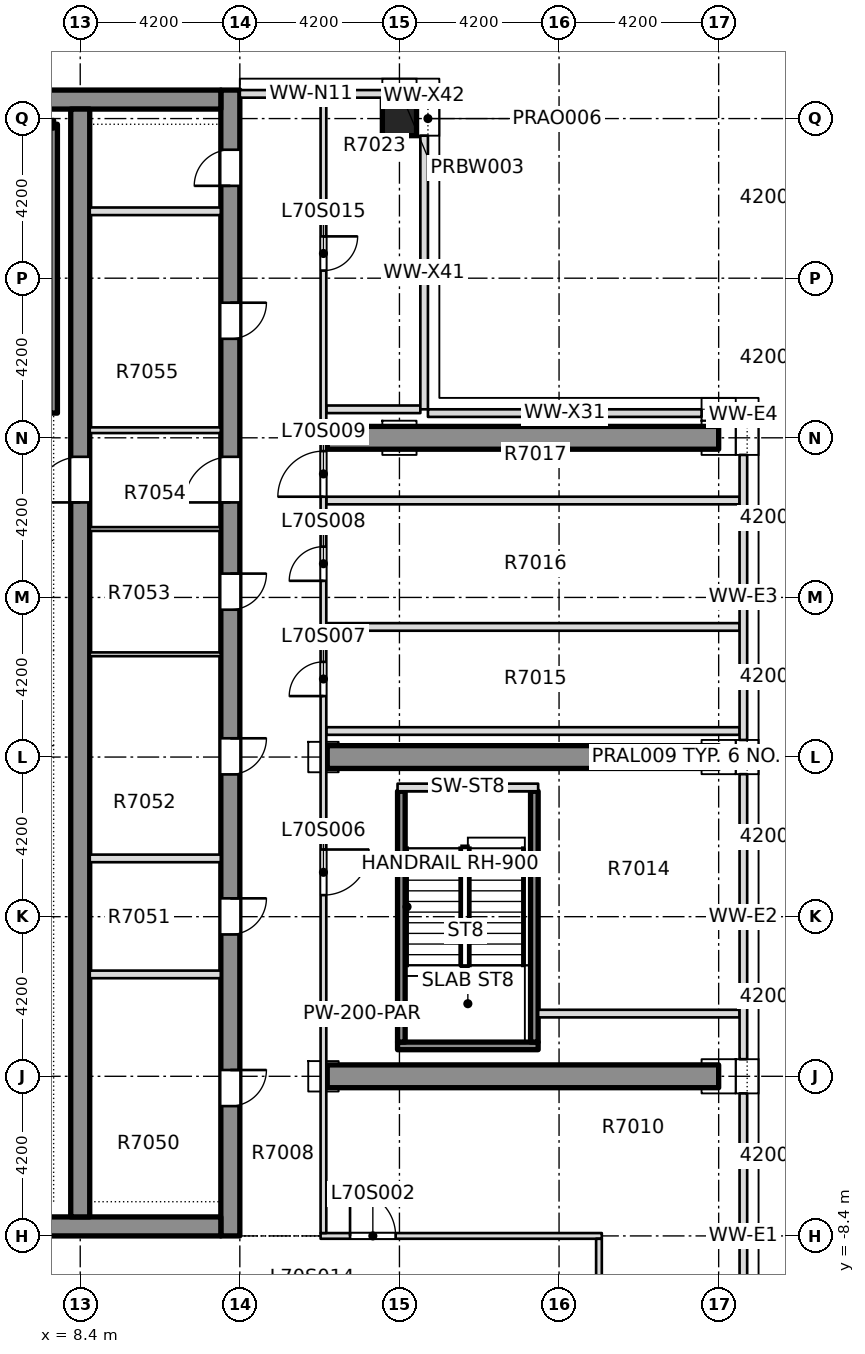
"""IFC4 building model, lengths in metres.
Left out: names, types, materials, properties, quantities, classifications, styles, units other than length and angle.
Written with IfcOpenShell. Run it as: python <this file> out.ifc"""

import sys

from ifc_helpers import new_model, si_unit, direction, frame, frame_2d, origin, origin_2d, place, context, subcontext, project, spatial, rectangle, extrude, element, fill, save


model = new_model("IFC4")
c1 = context("Model", 3, precision=1e-05, world=origin(), true_north=direction((0.0, 1.0)))
c2 = subcontext(c1, "Body", "Model", "MODEL_VIEW")
j1 = project(units=[si_unit("LENGTHUNIT", "METRE"), si_unit("PLANEANGLEUNIT", "RADIAN")], contexts=[c1])
p1 = place(None, origin())
s1 = spatial("IfcSite", under=j1, at=p1, CompositionType="ELEMENT")
p2 = place(p1, origin())
s2 = spatial("IfcBuilding", under=s1, at=p2, CompositionType="ELEMENT")
p3 = place(p2, frame((0.0, 0.0, 264.85)))
s3 = spatial("IfcBuildingStorey", under=s2, at=p3, CompositionType="ELEMENT", Elevation=264.85)
p4 = place(p3, frame((12.35, -8.4, -0.5), z_axis=(0.0, 0.0, 1.0), x_axis=(0.0, 1.0, 0.0)))
e1 = element("IfcWall", 1, at=p4, inside=s3, PredefinedType="SHEAR", context=c2, shape_type="SweptSolid", body=[
    extrude(rectangle(XDim=30.15, YDim=0.5, at=frame_2d((15.075, 0.0))), origin(), (0.0, 0.0, 1.0), 4.5),
])
p5 = place(p4, frame((3.416, 0.0, 0.5)))
e2 = element("IfcOpeningElement", 2, at=p5, cuts=e1, PredefinedType="OPENING", context=c2, shape_type="SweptSolid", body=[
    extrude(rectangle(XDim=0.95, YDim=2.1, at=frame_2d((0.475, 1.05))), frame((0.0, 0.26, 0.0), z_axis=(0.0, -1.0, 0.0), x_axis=(1.0, 0.0, 0.0)), (0.0, 0.0, 1.0), 0.52),
])
p6 = place(p4, frame((7.932, 0.0, 0.5)))
e3 = element("IfcOpeningElement", 3, at=p6, cuts=e1, PredefinedType="OPENING", context=c2, shape_type="SweptSolid", body=[
    extrude(rectangle(XDim=0.95, YDim=2.1, at=frame_2d((0.475, 1.05))), frame((0.0, 0.26, 0.0), z_axis=(0.0, -1.0, 0.0), x_axis=(1.0, 0.0, 0.0)), (0.0, 0.0, 1.0), 0.52),
])
p7 = place(p4, frame((12.144, 0.0, 0.5)))
e4 = element("IfcOpeningElement", 4, at=p7, cuts=e1, PredefinedType="OPENING", context=c2, shape_type="SweptSolid", body=[
    extrude(rectangle(XDim=0.95, YDim=2.1, at=frame_2d((0.475, 1.05))), frame((0.0, 0.26, 0.0), z_axis=(0.0, -1.0, 0.0), x_axis=(1.0, 0.0, 0.0)), (0.0, 0.0, 1.0), 0.52),
])
p8 = place(p4, frame((16.477, 0.0, 0.5)))
e5 = element("IfcOpeningElement", 5, at=p8, cuts=e1, PredefinedType="OPENING", context=c2, shape_type="SweptSolid", body=[
    extrude(rectangle(XDim=0.95, YDim=2.1, at=frame_2d((0.475, 1.05))), frame((0.0, 0.26, 0.0), z_axis=(0.0, -1.0, 0.0), x_axis=(1.0, 0.0, 0.0)), (0.0, 0.0, 1.0), 0.52),
])
p9 = place(p4, frame((23.605, 0.0, 0.5)))
e6 = element("IfcOpeningElement", 6, at=p9, cuts=e1, PredefinedType="OPENING", context=c2, shape_type="SweptSolid", body=[
    extrude(rectangle(XDim=0.95, YDim=2.1, at=frame_2d((0.475, 1.05))), frame((0.0, 0.26, 0.0), z_axis=(0.0, -1.0, 0.0), x_axis=(1.0, 0.0, 0.0)), (0.0, 0.0, 1.0), 0.52),
])
p10 = place(p4, frame((27.63, 0.0, 0.5)))
e7 = element("IfcOpeningElement", 7, at=p10, cuts=e1, PredefinedType="OPENING", context=c2, shape_type="SweptSolid", body=[
    extrude(rectangle(XDim=0.95, YDim=2.1, at=frame_2d((0.475, 1.05))), frame((0.0, 0.26, 0.0), z_axis=(0.0, -1.0, 0.0), x_axis=(1.0, 0.0, 0.0)), (0.0, 0.0, 1.0), 0.52),
])
p11 = place(p4, frame((19.3, 0.0, 0.5)))
e8 = element("IfcOpeningElement", 8, at=p11, cuts=e1, PredefinedType="OPENING", context=c2, shape_type="SweptSolid", body=[
    extrude(rectangle(XDim=1.2, YDim=2.1, at=frame_2d((0.6, 1.05))), frame((0.0, 0.26, 0.0), z_axis=(0.0, -1.0, 0.0), x_axis=(1.0, 0.0, 0.0)), (0.0, 0.0, 1.0), 0.52),
])
p12 = place(p3, frame((-12.1, -8.15, -0.5), z_axis=(0.0, 0.0, 1.0), x_axis=(1.0, 0.0, 0.0)))
e9 = element("IfcWall", 9, at=p12, inside=s3, PredefinedType="SHEAR", context=c2, shape_type="SweptSolid", body=[
    extrude(rectangle(XDim=24.2, YDim=0.5, at=frame_2d((12.1, 0.0))), origin(), (0.0, 0.0, 1.0), 4.5),
])
p13 = place(p12, frame((6.6, 0.0, 0.5)))
e10 = element("IfcOpeningElement", 10, at=p13, cuts=e9, PredefinedType="OPENING", context=c2, shape_type="SweptSolid", body=[
    extrude(rectangle(XDim=1.8, YDim=2.1, at=frame_2d((0.9, 1.05))), frame((0.0, 0.26, 0.0), z_axis=(0.0, -1.0, 0.0), x_axis=(1.0, 0.0, 0.0)), (0.0, 0.0, 1.0), 0.52),
])
p14 = place(p12, frame((15.8, 0.0, 0.5)))
e11 = element("IfcOpeningElement", 11, at=p14, cuts=e9, PredefinedType="OPENING", context=c2, shape_type="SweptSolid", body=[
    extrude(rectangle(XDim=1.8, YDim=2.1, at=frame_2d((0.9, 1.05))), frame((0.0, 0.26, 0.0), z_axis=(0.0, -1.0, 0.0), x_axis=(1.0, 0.0, 0.0)), (0.0, 0.0, 1.0), 0.52),
])
p15 = place(p3, frame((-12.1, 21.5, -0.5), z_axis=(0.0, 0.0, 1.0), x_axis=(1.0, 0.0, 0.0)))
e12 = element("IfcWall", 12, at=p15, inside=s3, PredefinedType="SHEAR", context=c2, shape_type="SweptSolid", body=[
    extrude(rectangle(XDim=24.2, YDim=0.5, at=frame_2d((12.1, 0.0))), origin(), (0.0, 0.0, 1.0), 4.5),
])
p16 = place(p3, frame((8.4, -7.9, -0.5), z_axis=(0.0, 0.0, 1.0), x_axis=(0.0, 1.0, 0.0)))
e13 = element("IfcWall", 13, at=p16, inside=s3, PredefinedType="SHEAR", context=c2, shape_type="SweptSolid", body=[
    extrude(rectangle(XDim=29.15, YDim=0.5, at=frame_2d((14.575, 0.0))), origin(), (0.0, 0.0, 1.0), 4.5),
])
p17 = place(p16, frame((18.8, 0.0, 0.5)))
e14 = element("IfcOpeningElement", 14, at=p17, cuts=e13, PredefinedType="OPENING", context=c2, shape_type="SweptSolid", body=[
    extrude(rectangle(XDim=1.2, YDim=2.1, at=frame_2d((0.6, 1.05))), frame((0.0, 0.26, 0.0), z_axis=(0.0, -1.0, 0.0), x_axis=(1.0, 0.0, 0.0)), (0.0, 0.0, 1.0), 0.52),
])
p18 = place(p3, frame((16.8, 21.0, -0.5), z_axis=(0.0, 0.0, 1.0), x_axis=(1.0, 0.0, 0.0)))
e15 = element("IfcColumn", 15, at=p18, inside=s3, PredefinedType="COLUMN", context=c2, shape_type="SweptSolid", body=[
    extrude(rectangle(XDim=0.9, YDim=0.9, at=origin_2d()), origin(), (0.0, 0.0, 1.0), 4.5),
])
for number, where, z_axis, x_axis in (
    (16, (14.9, -4.2, 0.0), (0.0, 0.0, 1.0), (1.0, 0.0, 0.0)),
    (17, (14.9, 4.2, 0.0), (0.0, 0.0, 1.0), (1.0, 0.0, 0.0)),
    (18, (14.9, 12.6, 0.0), (0.0, 0.0, 1.0), (1.0, 0.0, 0.0)),
):
    element("IfcWall", number, at=place(p3, frame(where, z_axis=z_axis, x_axis=x_axis)), inside=s3, PredefinedType="SHEAR", context=c2, shape_type="SweptSolid", body=[
        extrude(rectangle(XDim=10.3, YDim=0.6, at=frame_2d((5.15, 0.0))), origin(), (0.0, 0.0, 1.0), 4.0),
    ])
p19 = place(p3, frame((14.725, -8.4, 0.0), z_axis=(0.0, 0.0, 1.0), x_axis=(1.0, 0.0, 0.0)))
e19 = element("IfcWall", 19, at=p19, inside=s3, PredefinedType="PARTITIONING", context=c2, shape_type="SweptSolid", body=[
    extrude(rectangle(XDim=7.4, YDim=0.15, at=frame_2d((3.7, 0.0))), origin(), (0.0, 0.0, 1.0), 4.0),
])
p20 = place(p19, frame((0.775, 0.0, 0.0)))
e20 = element("IfcOpeningElement", 20, at=p20, cuts=e19, PredefinedType="OPENING", context=c2, shape_type="SweptSolid", body=[
    extrude(rectangle(XDim=1.2, YDim=2.1, at=frame_2d((0.6, 1.05))), frame((0.0, 0.085, 0.0), z_axis=(0.0, -1.0, 0.0), x_axis=(1.0, 0.0, 0.0)), (0.0, 0.0, 1.0), 0.17),
])
p21 = place(p3, frame((14.875, -2.55, 0.0), z_axis=(0.0, 0.0, 1.0), x_axis=(1.0, 0.0, 0.0)))
e21 = element("IfcWall", 21, at=p21, inside=s3, PredefinedType="PARTITIONING", context=c2, shape_type="SweptSolid", body=[
    extrude(rectangle(XDim=1.875, YDim=0.2, at=frame_2d((0.938, 0.0))), origin(), (0.0, 0.0, 1.0), 4.0),
])
p22 = place(p3, frame((20.45, -2.55, 0.0), z_axis=(0.0, 0.0, 1.0), x_axis=(1.0, 0.0, 0.0)))
e22 = element("IfcWall", 22, at=p22, inside=s3, PredefinedType="PARTITIONING", context=c2, shape_type="SweptSolid", body=[
    extrude(rectangle(XDim=5.3, YDim=0.2, at=frame_2d((2.65, 0.0))), origin(), (0.0, 0.0, 1.0), 4.0),
])
for number, where, z_axis, x_axis in (
    (23, (14.875, 4.885, 0.0), (0.0, 0.0, 1.0), (1.0, 0.0, 0.0)),
    (24, (14.875, 7.624, 0.0), (0.0, 0.0, 1.0), (1.0, 0.0, 0.0)),
    (25, (14.875, 10.95, 0.0), (0.0, 0.0, 1.0), (1.0, 0.0, 0.0)),
):
    element("IfcWall", number, at=place(p3, frame(where, z_axis=z_axis, x_axis=x_axis)), inside=s3, PredefinedType="PARTITIONING", context=c2, shape_type="SweptSolid", body=[
        extrude(rectangle(XDim=10.875, YDim=0.2, at=frame_2d((5.438, 0.0))), origin(), (0.0, 0.0, 1.0), 4.0),
    ])
p23 = place(p3, frame((14.875, 13.35, 0.0), z_axis=(0.0, 0.0, 1.0), x_axis=(1.0, 0.0, 0.0)))
e26 = element("IfcWall", 26, at=p23, inside=s3, PredefinedType="PARTITIONING", context=c2, shape_type="SweptSolid", body=[
    extrude(rectangle(XDim=2.475, YDim=0.2, at=frame_2d((1.238, 0.0))), origin(), (0.0, 0.0, 1.0), 4.0),
])
p24 = place(p3, frame((14.8, -8.325, 0.0), z_axis=(0.0, 0.0, 1.0), x_axis=(0.0, 1.0, 0.0)))
e27 = element("IfcWall", 27, at=p24, inside=s3, PredefinedType="PARTITIONING", context=c2, shape_type="SweptSolid", body=[
    extrude(rectangle(XDim=29.875, YDim=0.15, at=frame_2d((14.938, 0.0))), origin(), (0.0, 0.0, 1.0), 4.0),
])
p25 = place(p24, frame((8.892, 0.0, 0.0)))
e28 = element("IfcOpeningElement", 28, at=p25, cuts=e27, PredefinedType="OPENING", context=c2, shape_type="SweptSolid", body=[
    extrude(rectangle(XDim=1.2, YDim=2.1, at=frame_2d((0.6, 1.05))), frame((0.0, 0.085, 0.0), z_axis=(0.0, -1.0, 0.0), x_axis=(1.0, 0.0, 0.0)), (0.0, 0.0, 1.0), 0.17),
])
p26 = place(p24, frame((14.129, 0.0, 0.0)))
e29 = element("IfcOpeningElement", 29, at=p26, cuts=e27, PredefinedType="OPENING", context=c2, shape_type="SweptSolid", body=[
    extrude(rectangle(XDim=0.9, YDim=2.1, at=frame_2d((0.45, 1.05))), frame((0.0, 0.085, 0.0), z_axis=(0.0, -1.0, 0.0), x_axis=(1.0, 0.0, 0.0)), (0.0, 0.0, 1.0), 0.17),
])
p27 = place(p24, frame((17.162, 0.0, 0.0)))
e30 = element("IfcOpeningElement", 30, at=p27, cuts=e27, PredefinedType="OPENING", context=c2, shape_type="SweptSolid", body=[
    extrude(rectangle(XDim=0.9, YDim=2.1, at=frame_2d((0.45, 1.05))), frame((0.0, 0.085, 0.0), z_axis=(0.0, -1.0, 0.0), x_axis=(1.0, 0.0, 0.0)), (0.0, 0.0, 1.0), 0.17),
])
p28 = place(p24, frame((19.375, 0.0, 0.0)))
e31 = element("IfcOpeningElement", 31, at=p28, cuts=e27, PredefinedType="OPENING", context=c2, shape_type="SweptSolid", body=[
    extrude(rectangle(XDim=1.2, YDim=2.1, at=frame_2d((0.6, 1.05))), frame((0.0, 0.085, 0.0), z_axis=(0.0, -1.0, 0.0), x_axis=(1.0, 0.0, 0.0)), (0.0, 0.0, 1.0), 0.17),
])
p29 = place(p24, frame((25.325, 0.0, 0.0)))
e32 = element("IfcOpeningElement", 32, at=p29, cuts=e27, PredefinedType="OPENING", context=c2, shape_type="SweptSolid", body=[
    extrude(rectangle(XDim=0.9, YDim=2.1, at=frame_2d((0.45, 1.05))), frame((0.0, 0.085, 0.0), z_axis=(0.0, -1.0, 0.0), x_axis=(1.0, 0.0, 0.0)), (0.0, 0.0, 1.0), 0.17),
])
p30 = place(p3, frame((22.05, -12.299, 0.0), z_axis=(0.0, 0.0, 1.0), x_axis=(0.0, 1.0, 0.0)))
e33 = element("IfcWall", 33, at=p30, inside=s3, PredefinedType="PARTITIONING", context=c2, shape_type="SweptSolid", body=[
    extrude(rectangle(XDim=3.824, YDim=0.15, at=frame_2d((1.912, 0.0))), origin(), (0.0, 0.0, 1.0), 4.0),
])
for number, where, z_axis, x_axis in (
    (34, (25.85, -12.15, 0.0), (0.0, 0.0, 1.0), (0.0, 1.0, 0.0)),
    (35, (25.85, -3.75, 0.0), (0.0, 0.0, 1.0), (0.0, 1.0, 0.0)),
    (36, (25.85, 4.65, 0.0), (0.0, 0.0, 1.0), (0.0, 1.0, 0.0)),
):
    element("IfcWall", number, at=place(p3, frame(where, z_axis=z_axis, x_axis=x_axis)), inside=s3, PredefinedType="STANDARD", context=c2, shape_type="SweptSolid", body=[
        extrude(rectangle(XDim=7.5, YDim=0.2, at=frame_2d((3.75, 0.0))), origin(), (0.0, 0.0, 1.0), 4.0),
    ])
p31 = place(p3, frame((25.85, 13.05, 0.0), z_axis=(0.0, 0.0, 1.0), x_axis=(0.0, 1.0, 0.0)))
e37 = element("IfcWall", 37, at=p31, inside=s3, PredefinedType="STANDARD", context=c2, shape_type="SweptSolid", body=[
    extrude(rectangle(XDim=0.3, YDim=0.2, at=frame_2d((0.15, 0.0))), origin(), (0.0, 0.0, 1.0), 4.0),
])
for number, where, z_axis, x_axis in (
    (38, (24.75, 13.25, 0.0), (0.0, 0.0, 1.0), (-1.0, 0.0, 0.0)),
    (39, (17.45, 13.35, 0.0), (0.0, 0.0, 1.0), (0.0, 1.0, 0.0)),
):
    element("IfcWall", number, at=place(p3, frame(where, z_axis=z_axis, x_axis=x_axis)), inside=s3, PredefinedType="STANDARD", context=c2, shape_type="SweptSolid", body=[
        extrude(rectangle(XDim=7.2, YDim=0.2, at=frame_2d((3.6, 0.0))), origin(), (0.0, 0.0, 1.0), 4.0),
    ])
p32 = place(p3, frame((17.45, 21.45, 0.0), z_axis=(0.0, 0.0, 1.0), x_axis=(0.0, 1.0, 0.0)))
e40 = element("IfcWall", 40, at=p32, inside=s3, PredefinedType="STANDARD", context=c2, shape_type="SweptSolid", body=[
    extrude(rectangle(XDim=0.3, YDim=0.2, at=frame_2d((0.15, 0.0))), origin(), (0.0, 0.0, 1.0), 4.0),
])
p33 = place(p3, frame((16.35, 21.65, 0.0), z_axis=(0.0, 0.0, 1.0), x_axis=(-1.0, 0.0, 0.0)))
e41 = element("IfcWall", 41, at=p33, inside=s3, PredefinedType="STANDARD", context=c2, shape_type="SweptSolid", body=[
    extrude(rectangle(XDim=3.75, YDim=0.2, at=frame_2d((1.875, 0.0))), origin(), (0.0, 0.0, 1.0), 4.0),
])
for number, where, z_axis, x_axis in (
    (42, (8.651, -1.519, 0.0), (0.0, 0.0, 1.0), (1.0, 0.0, 0.0)),
    (43, (8.651, 1.533, 0.0), (0.0, 0.0, 1.0), (1.0, 0.0, 0.0)),
):
    element("IfcWall", number, at=place(p3, frame(where, z_axis=z_axis, x_axis=x_axis)), inside=s3, PredefinedType="PARTITIONING", context=c2, shape_type="SweptSolid", body=[
        extrude(rectangle(XDim=3.448, YDim=0.2, at=frame_2d((1.724, 0.0))), origin(), (0.0, 0.0, 1.0), 4.0),
    ])
for number, where, z_axis, x_axis in (
    (44, (8.651, 6.904, 0.0), (0.0, 0.0, 1.0), (1.0, 0.0, 0.0)),
    (45, (8.651, 10.2, 0.0), (0.0, 0.0, 1.0), (1.0, 0.0, 0.0)),
):
    element("IfcWall", number, at=place(p3, frame(where, z_axis=z_axis, x_axis=x_axis)), inside=s3, PredefinedType="PARTITIONING", context=c2, shape_type="SweptSolid", body=[
        extrude(rectangle(XDim=3.448, YDim=0.1, at=frame_2d((1.724, 0.0))), origin(), (0.0, 0.0, 1.0), 4.0),
    ])
p34 = place(p3, frame((8.651, 12.8, 0.0), z_axis=(0.0, 0.0, 1.0), x_axis=(1.0, 0.0, 0.0)))
e46 = element("IfcWall", 46, at=p34, inside=s3, PredefinedType="PARTITIONING", context=c2, shape_type="SweptSolid", body=[
    extrude(rectangle(XDim=3.448, YDim=0.15, at=frame_2d((1.724, 0.0))), origin(), (0.0, 0.0, 1.0), 2.5),
])
p35 = place(p3, frame((8.651, 18.56, 0.0), z_axis=(0.0, 0.0, 1.0), x_axis=(1.0, 0.0, 0.0)))
e47 = element("IfcWall", 47, at=p35, inside=s3, PredefinedType="PARTITIONING", context=c2, shape_type="SweptSolid", body=[
    extrude(rectangle(XDim=3.448, YDim=0.2, at=frame_2d((1.724, 0.0))), origin(), (0.0, 0.0, 1.0), 4.0),
])
p36 = place(p3, frame((16.75, -3.4, 0.0), z_axis=(0.0, 0.0, 1.0), x_axis=(1.0, 0.0, 0.0)))
e48 = element("IfcWall", 48, at=p36, inside=s3, PredefinedType="SOLIDWALL", context=c2, shape_type="SweptSolid", body=[
    extrude(rectangle(XDim=3.7, YDim=0.2, at=frame_2d((1.85, 0.0))), origin(), (0.0, 0.0, 1.0), 4.0),
])
p37 = place(p3, frame((16.75, 3.4, 0.0), z_axis=(0.0, 0.0, 1.0), x_axis=(1.0, 0.0, 0.0)))
e49 = element("IfcWall", 49, at=p37, inside=s3, PredefinedType="PARTITIONING", context=c2, shape_type="SweptSolid", body=[
    extrude(rectangle(XDim=3.7, YDim=0.2, at=frame_2d((1.85, 0.0))), origin(), (0.0, 0.0, 1.0), 4.0),
])
for number, where, z_axis, x_axis in (
    (50, (16.85, -3.3, 0.0), (0.0, 0.0, 1.0), (0.0, 1.0, 0.0)),
    (51, (20.35, -3.3, 0.0), (0.0, 0.0, 1.0), (0.0, 1.0, 0.0)),
):
    element("IfcWall", number, at=place(p3, frame(where, z_axis=z_axis, x_axis=x_axis)), inside=s3, PredefinedType="SOLIDWALL", context=c2, shape_type="SweptSolid", body=[
        extrude(rectangle(XDim=6.6, YDim=0.2, at=frame_2d((3.3, 0.0))), origin(), (0.0, 0.0, 1.0), 4.0),
    ])
p38 = place(p3, frame((7.7, 13.25, 0.0), z_axis=(0.0, 0.0, 1.0), x_axis=(0.0, 1.0, 0.0)))
e52 = element("IfcWall", 52, at=p38, inside=s3, PredefinedType="SOLIDWALL", context=c2, shape_type="SweptSolid", body=[
    extrude(rectangle(XDim=7.6, YDim=0.2, at=frame_2d((3.8, 0.0))), origin(), (0.0, 0.0, 1.0), 4.0),
])
p39 = place(p3, frame((4.1, 20.85, 0.0), z_axis=(0.0, 0.0, 1.0), x_axis=(1.0, 0.0, 0.0)))
e53 = element("IfcWall", 53, at=p39, inside=s3, PredefinedType="SOLIDWALL", context=c2, shape_type="SweptSolid", body=[
    extrude(rectangle(XDim=3.6, YDim=0.2, at=frame_2d((1.8, 0.0))), origin(), (0.0, 0.0, 1.0), 4.0),
])
p40 = place(p20, origin())
e54 = element("IfcDoor", 54, at=p40, inside=s3, OperationType="SINGLE_SWING_LEFT", PredefinedType="DOOR", context=c2, shape_type="SweptSolid", body=[
    extrude(rectangle(XDim=1.2, YDim=2.1, at=frame_2d((0.6, 1.05))), frame((0.0, 0.025, 0.0), z_axis=(0.0, -1.0, 0.0), x_axis=(1.0, 0.0, 0.0)), (0.0, 0.0, 1.0), 0.05),
])
fill(e20, e54)
p41 = place(p25, origin())
e55 = element("IfcDoor", 55, at=p41, inside=s3, OperationType="SINGLE_SWING_LEFT", PredefinedType="DOOR", context=c2, shape_type="SweptSolid", body=[
    extrude(rectangle(XDim=1.2, YDim=2.1, at=frame_2d((0.6, 1.05))), frame((0.0, 0.025, 0.0), z_axis=(0.0, -1.0, 0.0), x_axis=(1.0, 0.0, 0.0)), (0.0, 0.0, 1.0), 0.05),
])
fill(e28, e55)
p42 = place(p26, origin())
e56 = element("IfcDoor", 56, at=p42, inside=s3, OperationType="SINGLE_SWING_LEFT", PredefinedType="DOOR", context=c2, shape_type="SweptSolid", body=[
    extrude(rectangle(XDim=0.9, YDim=2.1, at=frame_2d((0.45, 1.05))), frame((0.0, 0.025, 0.0), z_axis=(0.0, -1.0, 0.0), x_axis=(1.0, 0.0, 0.0)), (0.0, 0.0, 1.0), 0.05),
])
fill(e29, e56)
p43 = place(p27, origin())
e57 = element("IfcDoor", 57, at=p43, inside=s3, OperationType="SINGLE_SWING_LEFT", PredefinedType="DOOR", context=c2, shape_type="SweptSolid", body=[
    extrude(rectangle(XDim=0.9, YDim=2.1, at=frame_2d((0.45, 1.05))), frame((0.0, 0.025, 0.0), z_axis=(0.0, -1.0, 0.0), x_axis=(1.0, 0.0, 0.0)), (0.0, 0.0, 1.0), 0.05),
])
fill(e30, e57)
p44 = place(p28, origin())
e58 = element("IfcDoor", 58, at=p44, inside=s3, OperationType="SINGLE_SWING_RIGHT", PredefinedType="DOOR", context=c2, shape_type="SweptSolid", body=[
    extrude(rectangle(XDim=1.2, YDim=2.1, at=frame_2d((0.6, 1.05))), frame((0.0, 0.025, 0.0), z_axis=(0.0, -1.0, 0.0), x_axis=(1.0, 0.0, 0.0)), (0.0, 0.0, 1.0), 0.05),
])
fill(e31, e58)
p45 = place(p29, origin())
e59 = element("IfcDoor", 59, at=p45, inside=s3, OperationType="SINGLE_SWING_RIGHT", PredefinedType="DOOR", context=c2, shape_type="SweptSolid", body=[
    extrude(rectangle(XDim=0.9, YDim=2.1, at=frame_2d((0.45, 1.05))), frame((0.0, 0.025, 0.0), z_axis=(0.0, -1.0, 0.0), x_axis=(1.0, 0.0, 0.0)), (0.0, 0.0, 1.0), 0.05),
])
fill(e32, e59)
p46 = place(p5, origin())
e60 = element("IfcDoor", 60, at=p46, inside=s3, OperationType="SINGLE_SWING_LEFT", PredefinedType="DOOR", context=c2, shape_type="SweptSolid", body=[
    extrude(rectangle(XDim=0.95, YDim=2.1, at=frame_2d((0.475, 1.05))), frame((0.0, 0.025, 0.0), z_axis=(0.0, -1.0, 0.0), x_axis=(1.0, 0.0, 0.0)), (0.0, 0.0, 1.0), 0.05),
])
fill(e2, e60)
p47 = place(p6, origin())
e61 = element("IfcDoor", 61, at=p47, inside=s3, OperationType="SINGLE_SWING_LEFT", PredefinedType="DOOR", context=c2, shape_type="SweptSolid", body=[
    extrude(rectangle(XDim=0.95, YDim=2.1, at=frame_2d((0.475, 1.05))), frame((0.0, 0.025, 0.0), z_axis=(0.0, -1.0, 0.0), x_axis=(1.0, 0.0, 0.0)), (0.0, 0.0, 1.0), 0.05),
])
fill(e3, e61)
p48 = place(p7, origin())
e62 = element("IfcDoor", 62, at=p48, inside=s3, OperationType="SINGLE_SWING_LEFT", PredefinedType="DOOR", context=c2, shape_type="SweptSolid", body=[
    extrude(rectangle(XDim=0.95, YDim=2.1, at=frame_2d((0.475, 1.05))), frame((0.0, 0.025, 0.0), z_axis=(0.0, -1.0, 0.0), x_axis=(1.0, 0.0, 0.0)), (0.0, 0.0, 1.0), 0.05),
])
fill(e4, e62)
p49 = place(p8, origin())
e63 = element("IfcDoor", 63, at=p49, inside=s3, OperationType="SINGLE_SWING_LEFT", PredefinedType="DOOR", context=c2, shape_type="SweptSolid", body=[
    extrude(rectangle(XDim=0.95, YDim=2.1, at=frame_2d((0.475, 1.05))), frame((0.0, 0.025, 0.0), z_axis=(0.0, -1.0, 0.0), x_axis=(1.0, 0.0, 0.0)), (0.0, 0.0, 1.0), 0.05),
])
fill(e5, e63)
p50 = place(p9, origin())
e64 = element("IfcDoor", 64, at=p50, inside=s3, OperationType="SINGLE_SWING_LEFT", PredefinedType="DOOR", context=c2, shape_type="SweptSolid", body=[
    extrude(rectangle(XDim=0.95, YDim=2.1, at=frame_2d((0.475, 1.05))), frame((0.0, 0.025, 0.0), z_axis=(0.0, -1.0, 0.0), x_axis=(1.0, 0.0, 0.0)), (0.0, 0.0, 1.0), 0.05),
])
fill(e6, e64)
p51 = place(p10, origin())
e65 = element("IfcDoor", 65, at=p51, inside=s3, OperationType="SINGLE_SWING_LEFT", PredefinedType="DOOR", context=c2, shape_type="SweptSolid", body=[
    extrude(rectangle(XDim=0.95, YDim=2.1, at=frame_2d((0.475, 1.05))), frame((0.0, 0.025, 0.0), z_axis=(0.0, -1.0, 0.0), x_axis=(1.0, 0.0, 0.0)), (0.0, 0.0, 1.0), 0.05),
])
fill(e7, e65)
p52 = place(p11, origin())
e66 = element("IfcDoor", 66, at=p52, inside=s3, OperationType="SINGLE_SWING_LEFT", PredefinedType="DOOR", context=c2, shape_type="SweptSolid", body=[
    extrude(rectangle(XDim=1.2, YDim=2.1, at=frame_2d((0.6, 1.05))), frame((0.0, 0.025, 0.0), z_axis=(0.0, -1.0, 0.0), x_axis=(1.0, 0.0, 0.0)), (0.0, 0.0, 1.0), 0.05),
])
fill(e8, e66)
p53 = place(p17, origin())
e67 = element("IfcDoor", 67, at=p53, inside=s3, OperationType="SINGLE_SWING_LEFT", PredefinedType="DOOR", context=c2, shape_type="SweptSolid", body=[
    extrude(rectangle(XDim=1.2, YDim=2.1, at=frame_2d((0.6, 1.05))), frame((0.0, 0.025, 0.0), z_axis=(0.0, -1.0, 0.0), x_axis=(1.0, 0.0, 0.0)), (0.0, 0.0, 1.0), 0.05),
])
fill(e14, e67)
save(model, sys.argv[1])
